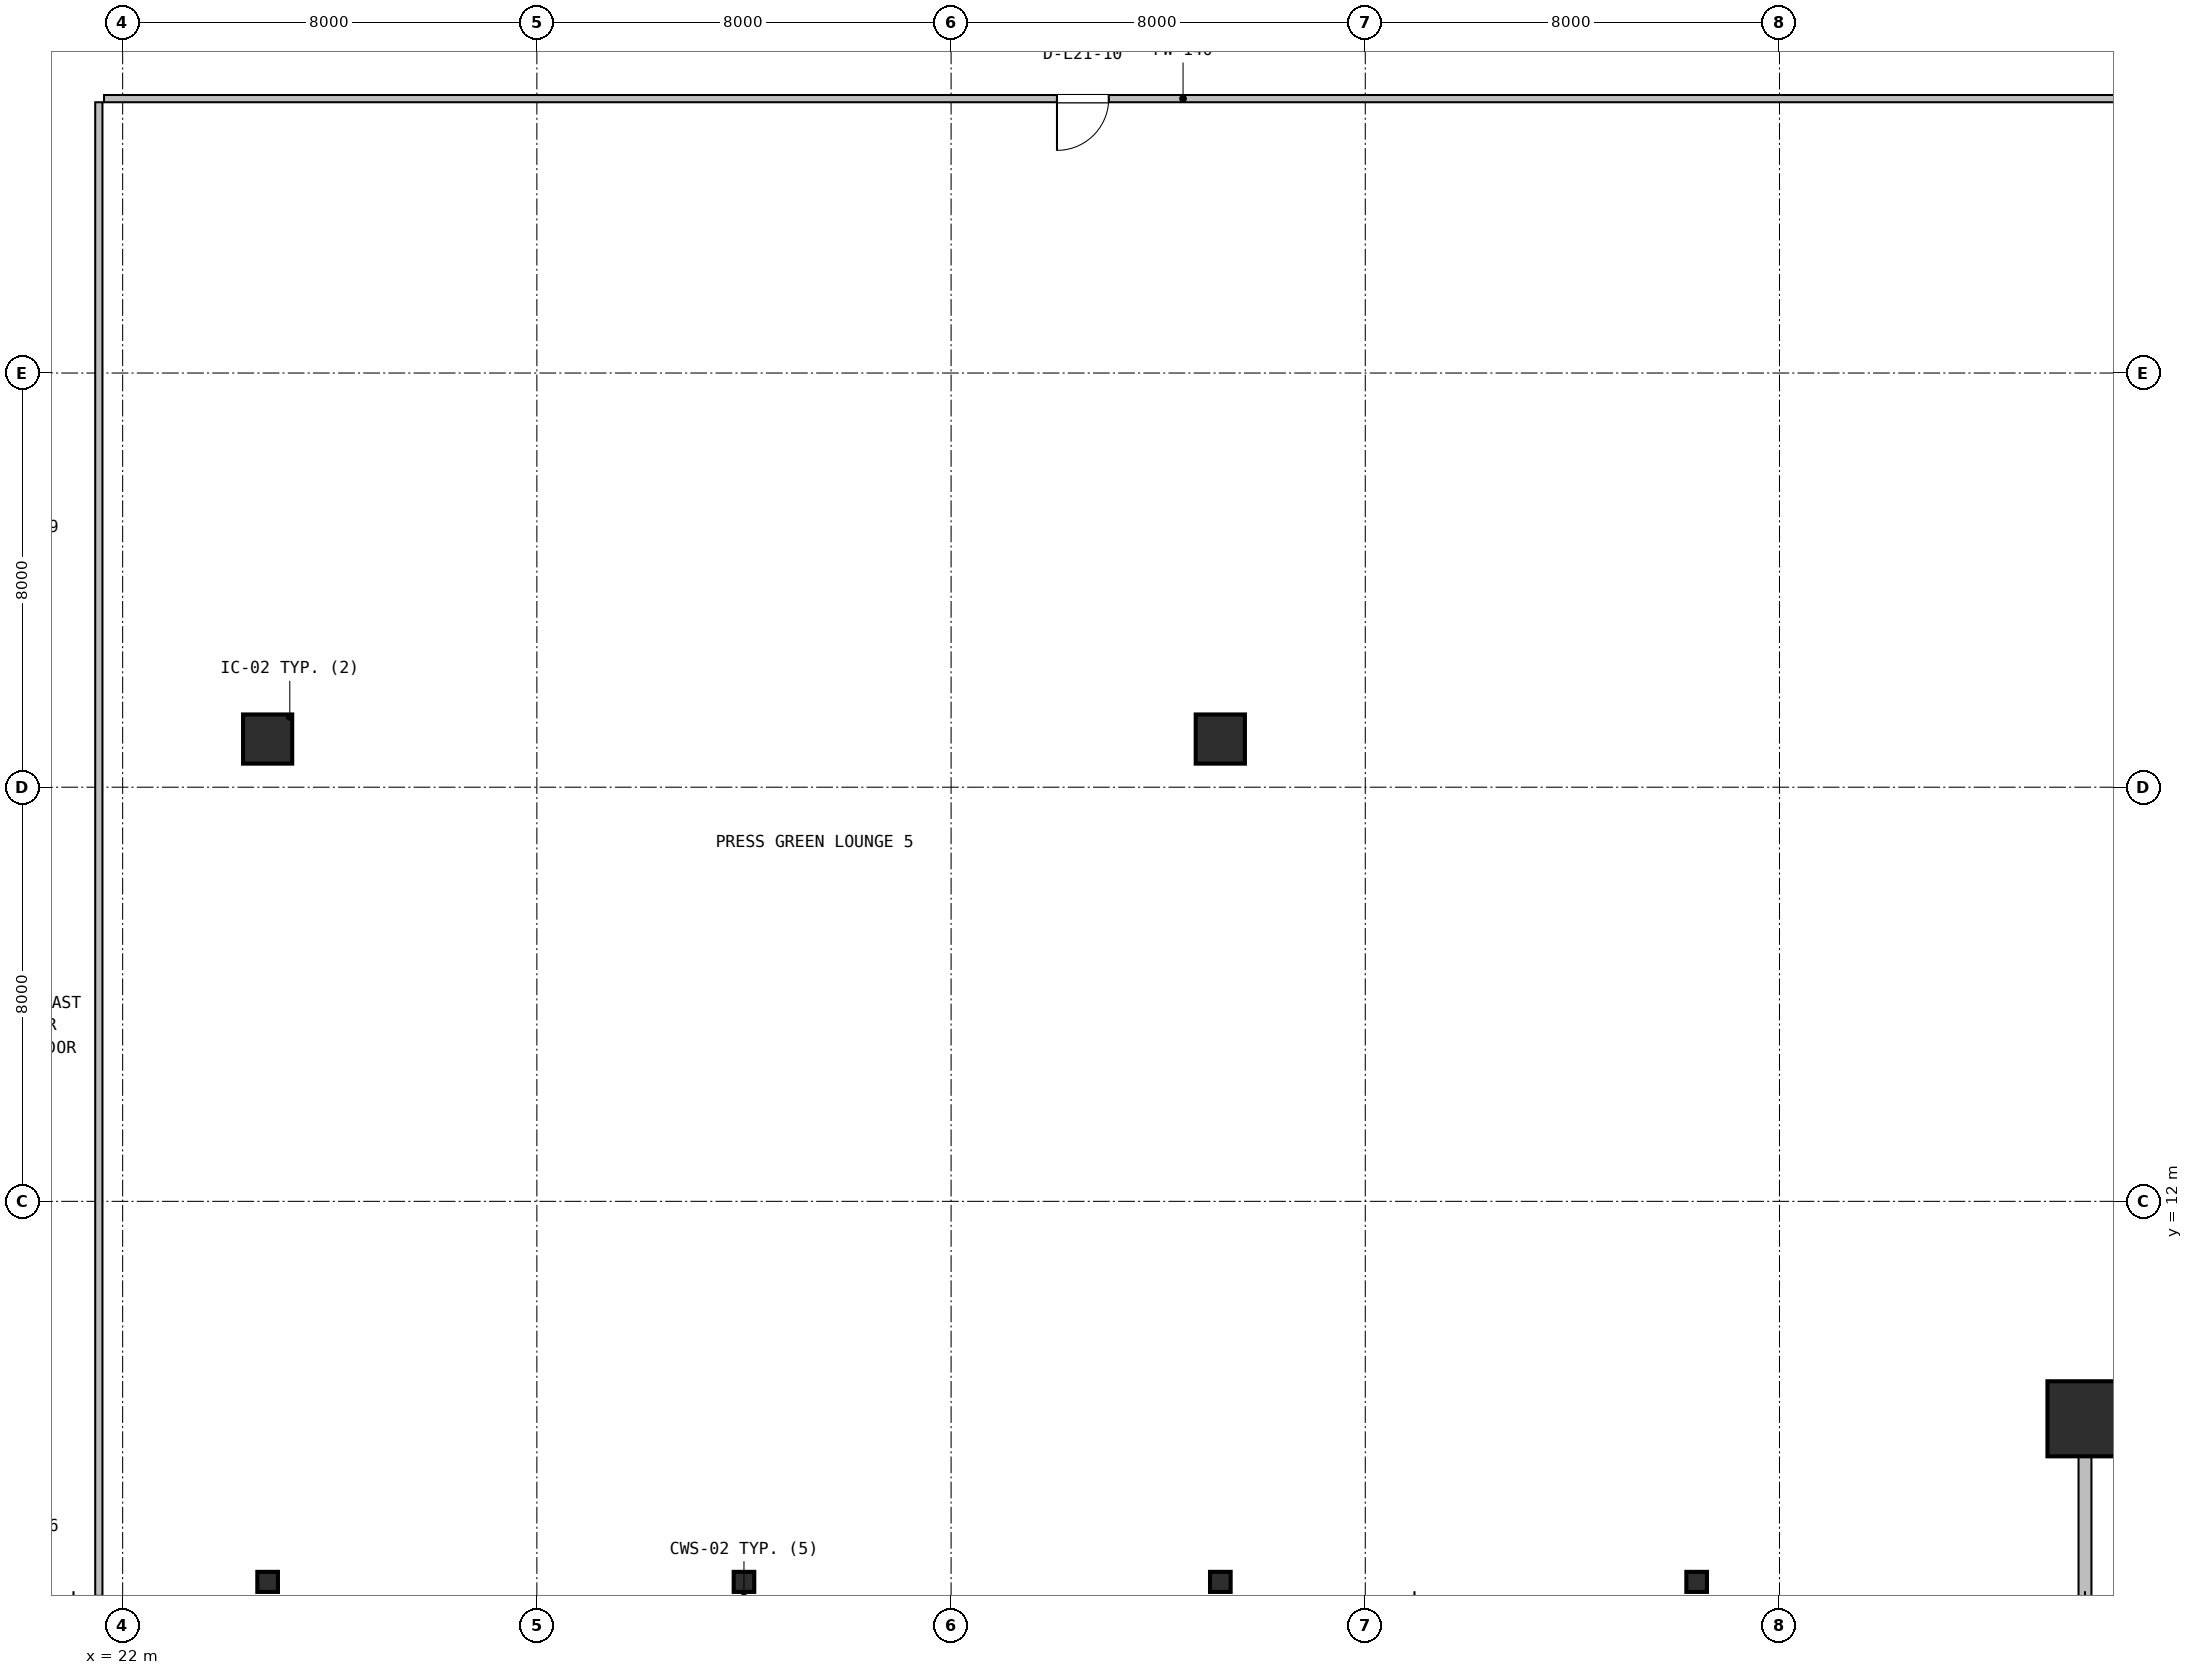
"""IFC4 building model, lengths in metres.
Left out: names, types, materials, properties, quantities, classifications, styles, units other than length and angle.
Written with IfcOpenShell. Run it as: python <this file> out.ifc"""

import sys

from ifc_helpers import new_model, si_unit, direction, frame, frame_2d, origin, origin_2d, place, context, subcontext, project, spatial, rectangle, hollow_rectangle, i_section, extrude, source, transform, mapped, element, fill, save


model = new_model("IFC4")
c1 = context("Model", 3, precision=1e-05, world=origin(), true_north=direction((0.0, 1.0)))
c2 = subcontext(c1, "Body", "Model", "MODEL_VIEW")
j1 = project(units=[si_unit("LENGTHUNIT", "METRE"), si_unit("PLANEANGLEUNIT", "RADIAN")], contexts=[c1])
p1 = place(None, origin())
s1 = spatial("IfcSite", under=j1, at=p1, CompositionType="ELEMENT")
p2 = place(p1, origin())
s2 = spatial("IfcBuilding", under=s1, at=p2, CompositionType="ELEMENT")
p3 = place(p2, frame((0.0, 0.0, 90.8)))
s3 = spatial("IfcBuildingStorey", under=s2, at=p3, CompositionType="ELEMENT", Elevation=90.8)
m1 = source(origin(), c2, "Body", "SweptSolid", [
    extrude(hollow_rectangle(XDim=1.45, YDim=1.45, WallThickness=0.055, at=origin_2d()), origin(), (0.0, 0.0, 1.0), 3.8),
])
p4 = place(p3, frame((59.9, 7.8, 0.0), z_axis=(0.0, 0.0, 1.0), x_axis=(1.0, 0.0, 0.0)))
e1 = element("IfcColumn", 1, at=p4, inside=s3, PredefinedType="COLUMN", context=c2, shape_type="MappedRepresentation", body=[
    mapped(m1, transform((0.0, 0.0, 0.0), x_axis=(1.0, 0.0, 0.0), y_axis=(0.0, 1.0, 0.0), z_axis=(0.0, 0.0, 1.0), scale=1.0)),
])
m2 = source(origin(), c2, "Body", "SweptSolid", [
    extrude(i_section(OverallWidth=0.398, OverallDepth=0.387, WebThickness=0.021, FlangeThickness=0.033, FilletRadius=0.018, at=origin_2d()), origin(), (0.0, 0.0, 1.0), 3.8),
])
for number, where, z_axis, x_axis in (
    (2, (24.8, 4.65, 0.0), (0.0, 0.0, 1.0), (1.0, 0.0, 0.0)),
    (3, (34.0, 4.65, 0.0), (0.0, 0.0, 1.0), (1.0, 0.0, 0.0)),
    (4, (43.2, 4.65, 0.0), (0.0, 0.0, 1.0), (1.0, 0.0, 0.0)),
    (5, (52.4, 4.65, 0.0), (0.0, 0.0, 1.0), (1.0, 0.0, 0.0)),
):
    element("IfcColumn", number, at=place(p3, frame(where, z_axis=z_axis, x_axis=x_axis)), inside=s3, PredefinedType="COLUMN", context=c2, shape_type="MappedRepresentation", body=[
        mapped(m2, transform((0.0, 0.0, 0.0), x_axis=(1.0, 0.0, 0.0), y_axis=(0.0, 1.0, 0.0), z_axis=(0.0, 0.0, 1.0), scale=1.0)),
    ])
m3 = source(origin(), c2, "Body", "SweptSolid", [
    extrude(rectangle(XDim=0.95, YDim=0.95, at=origin_2d()), origin(), (0.0, 0.0, 1.0), 3.8),
])
for number, where, z_axis, x_axis in (
    (6, (24.8, 20.93, 0.0), (0.0, 0.0, 1.0), (1.0, 0.0, 0.0)),
    (7, (43.2, 20.93, 0.0), (0.0, 0.0, 1.0), (1.0, 0.0, 0.0)),
):
    element("IfcColumn", number, at=place(p3, frame(where, z_axis=z_axis, x_axis=x_axis)), inside=s3, PredefinedType="COLUMN", context=c2, shape_type="MappedRepresentation", body=[
        mapped(m3, transform((0.0, 0.0, 0.0), x_axis=(1.0, 0.0, 0.0), y_axis=(0.0, 1.0, 0.0), z_axis=(0.0, 0.0, 1.0), scale=1.0)),
    ])
p5 = place(p3, frame((59.9, 4.28, 0.0), z_axis=(0.0, 0.0, 1.0), x_axis=(0.0, 1.0, 0.0)))
e8 = element("IfcWall", 8, at=p5, inside=s3, PredefinedType="SOLIDWALL", context=c2, shape_type="SweptSolid", body=[
    extrude(rectangle(XDim=3.6, YDim=0.25, at=frame_2d((1.8, 0.0))), origin(), (0.0, 0.0, 1.0), 3.108),
])
p6 = place(p3, frame((21.64, 33.3, 0.0), z_axis=(0.0, 0.0, 1.0), x_axis=(1.0, 0.0, 0.0)))
e9 = element("IfcWall", 9, at=p6, inside=s3, PredefinedType="PARTITIONING", context=c2, shape_type="SweptSolid", body=[
    extrude(rectangle(XDim=41.68, YDim=0.14, at=frame_2d((20.84, 0.0))), origin(), (0.0, 0.0, 1.0), 2.83),
])
p7 = place(p6, frame((18.405, 0.0, 0.0)))
e10 = element("IfcOpeningElement", 10, at=p7, cuts=e9, PredefinedType="OPENING", context=c2, shape_type="SweptSolid", body=[
    extrude(rectangle(XDim=1.0, YDim=2.1, at=frame_2d((0.5, 1.05))), frame((0.0, 0.08, 0.0), z_axis=(0.0, -1.0, 0.0), x_axis=(1.0, 0.0, 0.0)), (0.0, 0.0, 1.0), 0.16),
])
p8 = place(p3, frame((21.54, 4.38, 0.0), z_axis=(0.0, 0.0, 1.0), x_axis=(0.0, 1.0, 0.0)))
e11 = element("IfcWall", 11, at=p8, inside=s3, PredefinedType="PARTITIONING", context=c2, shape_type="SweptSolid", body=[
    extrude(rectangle(XDim=28.85, YDim=0.14, at=frame_2d((14.425, 0.0))), origin(), (0.0, 0.0, 1.0), 3.108),
])
m4 = source(origin(), c2, "Body", "SweptSolid", [
    extrude(rectangle(XDim=1.0, YDim=2.1, at=frame_2d((0.5, 1.05))), frame((0.0, 0.025, 0.0), z_axis=(0.0, -1.0, 0.0), x_axis=(1.0, 0.0, 0.0)), (0.0, 0.0, 1.0), 0.05),
])
p9 = place(p7, frame((1.0, 0.0, 0.0), z_axis=(0.0, 0.0, 1.0), x_axis=(-1.0, 0.0, 0.0)))
e12 = element("IfcDoor", 12, at=p9, inside=s3, OperationType="SINGLE_SWING_LEFT", PredefinedType="DOOR", context=c2, shape_type="MappedRepresentation", body=[
    mapped(m4, transform((0.0, 0.0, 0.0), x_axis=(1.0, 0.0, 0.0), y_axis=(0.0, 1.0, 0.0), z_axis=(0.0, 0.0, 1.0), scale=1.0)),
])
fill(e10, e12)
save(model, sys.argv[1])
